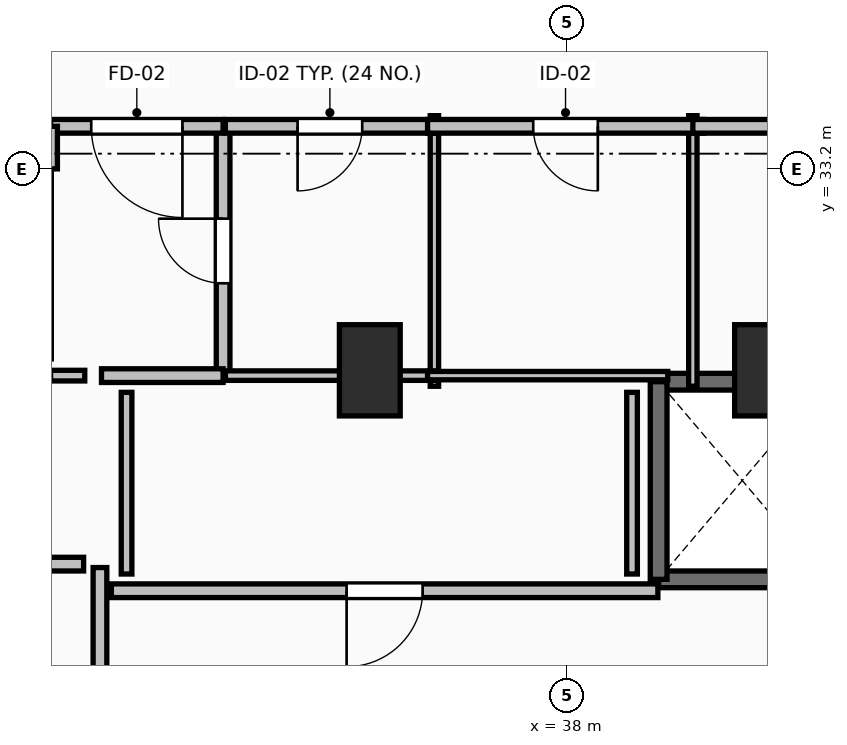
"""IFC4 building model, lengths in metres.
Left out: names, types, materials, properties, quantities, classifications, styles, units other than length and angle.
Written with IfcOpenShell. Run it as: python <this file> out.ifc"""

import sys

from ifc_helpers import new_model, si_unit, direction, frame, frame_2d, origin, origin_2d, place, context, subcontext, project, spatial, rectangle, extrude, element, fill, save


model = new_model("IFC4")
c1 = context("Model", 3, precision=1e-05, world=origin(), true_north=direction((0.0, 1.0)))
c2 = subcontext(c1, "Body", "Model", "MODEL_VIEW")
j1 = project(units=[si_unit("LENGTHUNIT", "METRE"), si_unit("PLANEANGLEUNIT", "RADIAN")], contexts=[c1])
p1 = place(None, origin())
s1 = spatial("IfcSite", under=j1, at=p1, CompositionType="ELEMENT")
p2 = place(p1, origin())
s2 = spatial("IfcBuilding", under=s1, at=p2, CompositionType="ELEMENT")
p3 = place(p2, frame((0.0, 0.0, 139.6)))
s3 = spatial("IfcBuildingStorey", under=s2, at=p3, CompositionType="ELEMENT", Elevation=139.6)
for number, where, z_axis, x_axis in (
    (1, (35.4, 30.55, 0.0), (0.0, 0.0, 1.0), (1.0, 0.0, 0.0)),
    (2, (40.6, 30.55, 0.0), (0.0, 0.0, 1.0), (1.0, 0.0, 0.0)),
):
    element("IfcColumn", number, at=place(p3, frame(where, z_axis=z_axis, x_axis=x_axis)), inside=s3, PredefinedType="PILASTER", context=c2, shape_type="SweptSolid", body=[
        extrude(rectangle(XDim=0.8, YDim=1.2, at=origin_2d()), origin(), (0.0, 0.0, 1.0), 3.5),
    ])
for number, where, z_axis, x_axis in (
    (3, (39.2, 27.8, 0.0), (0.0, 0.0, 1.0), (1.0, 0.0, 0.0)),
    (4, (41.4, 30.4, 0.0), (0.0, 0.0, 1.0), (-1.0, 0.0, 0.0)),
):
    element("IfcWall", number, at=place(p3, frame(where, z_axis=z_axis, x_axis=x_axis)), inside=s3, PredefinedType="SOLIDWALL", context=c2, shape_type="SweptSolid", body=[
        extrude(rectangle(XDim=2.2, YDim=0.22, at=frame_2d((1.1, 0.0))), origin(), (0.0, 0.0, 1.0), 3.24),
    ])
p4 = place(p3, frame((39.2, 30.4, 0.0), z_axis=(0.0, 0.0, 1.0), x_axis=(0.0, -1.0, 0.0)))
e5 = element("IfcWall", 5, at=p4, inside=s3, PredefinedType="SOLIDWALL", context=c2, shape_type="SweptSolid", body=[
    extrude(rectangle(XDim=2.6, YDim=0.22, at=frame_2d((1.3, 0.0))), origin(), (0.0, 0.0, 1.0), 3.24),
])
p5 = place(p3, frame((31.85, 24.045, 0.0), z_axis=(0.0, 0.0, 1.0), x_axis=(0.0, 1.0, 0.0)))
e6 = element("IfcWall", 6, at=p5, inside=s3, PredefinedType="PARTITIONING", context=c2, shape_type="SweptSolid", body=[
    extrude(rectangle(XDim=3.91, YDim=0.18, at=frame_2d((1.955, 0.0))), origin(), (0.0, 0.0, 1.0), 3.24),
])
p6 = place(p5, frame((1.355, 0.0, 0.0)))
e7 = element("IfcOpeningElement", 7, at=p6, cuts=e6, PredefinedType="OPENING", context=c2, shape_type="SweptSolid", body=[
    extrude(rectangle(XDim=1.2, YDim=2.15, at=frame_2d((0.6, 1.075))), frame((0.0, 0.105, 0.0), z_axis=(0.0, -1.0, 0.0), x_axis=(1.0, 0.0, 0.0)), (0.0, 0.0, 1.0), 0.21),
])
p7 = place(p3, frame((33.47, 30.48, 0.0), z_axis=(0.0, 0.0, 1.0), x_axis=(0.0, 1.0, 0.0)))
e8 = element("IfcWall", 8, at=p7, inside=s3, PredefinedType="PARTITIONING", context=c2, shape_type="SweptSolid", body=[
    extrude(rectangle(XDim=3.28, YDim=0.18, at=frame_2d((1.64, 0.0))), origin(), (0.0, 0.0, 1.0), 3.24),
])
p8 = place(p7, frame((1.215, 0.0, 0.0)))
e9 = element("IfcOpeningElement", 9, at=p8, cuts=e8, PredefinedType="OPENING", context=c2, shape_type="SweptSolid", body=[
    extrude(rectangle(XDim=0.85, YDim=2.1, at=frame_2d((0.425, 1.05))), frame((0.0, 0.105, 0.0), z_axis=(0.0, -1.0, 0.0), x_axis=(1.0, 0.0, 0.0)), (0.0, 0.0, 1.0), 0.21),
])
p9 = place(p3, frame((31.87, 30.48, 0.0), z_axis=(0.0, 0.0, 1.0), x_axis=(1.0, 0.0, 0.0)))
e10 = element("IfcWall", 10, at=p9, inside=s3, PredefinedType="PARTITIONING", context=c2, shape_type="SweptSolid", body=[
    extrude(rectangle(XDim=1.6, YDim=0.18, at=frame_2d((0.8, 0.0))), origin(), (0.0, 0.0, 1.0), 3.24),
])
p10 = place(p3, frame((33.47, 33.76, 0.0), z_axis=(0.0, 0.0, 1.0), x_axis=(-1.0, 0.0, 0.0)))
e11 = element("IfcWall", 11, at=p10, inside=s3, PredefinedType="PARTITIONING", context=c2, shape_type="SweptSolid", body=[
    extrude(rectangle(XDim=2.27, YDim=0.18, at=frame_2d((1.135, 0.0))), origin(), (0.0, 0.0, 1.0), 3.24),
])
p11 = place(p10, frame((0.535, 0.0, 0.0)))
e12 = element("IfcOpeningElement", 12, at=p11, cuts=e11, PredefinedType="OPENING", context=c2, shape_type="SweptSolid", body=[
    extrude(rectangle(XDim=1.2, YDim=2.15, at=frame_2d((0.6, 1.075))), frame((0.0, 0.105, 0.0), z_axis=(0.0, -1.0, 0.0), x_axis=(1.0, 0.0, 0.0)), (0.0, 0.0, 1.0), 0.21),
])
p12 = place(p3, frame((31.2, 33.76, 0.0), z_axis=(0.0, 0.0, 1.0), x_axis=(0.0, -1.0, 0.0)))
e13 = element("IfcWall", 13, at=p12, inside=s3, PredefinedType="PARTITIONING", context=c2, shape_type="SweptSolid", body=[
    extrude(rectangle(XDim=0.56, YDim=0.18, at=frame_2d((0.28, 0.0))), origin(), (0.0, 0.0, 1.0), 3.24),
])
p13 = place(p3, frame((39.19, 27.65, 0.0), z_axis=(0.0, 0.0, 1.0), x_axis=(-1.0, 0.0, 0.0)))
e14 = element("IfcWall", 14, at=p13, inside=s3, PredefinedType="PARTITIONING", context=c2, shape_type="SweptSolid", body=[
    extrude(rectangle(XDim=7.19, YDim=0.18, at=frame_2d((3.595, 0.0))), origin(), (0.0, 0.0, 1.0), 3.24),
])
p14 = place(p13, frame((3.095, 0.0, 0.0)))
e15 = element("IfcOpeningElement", 15, at=p14, cuts=e14, PredefinedType="OPENING", context=c2, shape_type="SweptSolid", body=[
    extrude(rectangle(XDim=1.0, YDim=2.15, at=frame_2d((0.5, 1.075))), frame((0.0, 0.105, 0.0), z_axis=(0.0, -1.0, 0.0), x_axis=(1.0, 0.0, 0.0)), (0.0, 0.0, 1.0), 0.21),
])
p15 = place(p3, frame((36.25, 30.34, 0.0), z_axis=(0.0, 0.0, 1.0), x_axis=(0.0, 1.0, 0.0)))
e16 = element("IfcWall", 16, at=p15, inside=s3, PredefinedType="PARTITIONING", context=c2, shape_type="SweptSolid", body=[
    extrude(rectangle(XDim=3.56, YDim=0.11, at=frame_2d((1.78, 0.0))), origin(), (0.0, 0.0, 1.0), 2.432),
])
p16 = place(p3, frame((33.5, 30.48, 0.0), z_axis=(0.0, 0.0, 1.0), x_axis=(1.0, 0.0, 0.0)))
e17 = element("IfcWall", 17, at=p16, inside=s3, PredefinedType="PARTITIONING", context=c2, shape_type="SweptSolid", body=[
    extrude(rectangle(XDim=2.75, YDim=0.125, at=frame_2d((1.375, 0.0))), origin(), (0.0, 0.0, 1.0), 2.432),
])
p17 = place(p3, frame((36.25, 33.76, 0.0), z_axis=(0.0, 0.0, 1.0), x_axis=(-1.0, 0.0, 0.0)))
e18 = element("IfcWall", 18, at=p17, inside=s3, PredefinedType="PARTITIONING", context=c2, shape_type="SweptSolid", body=[
    extrude(rectangle(XDim=2.75, YDim=0.18, at=frame_2d((1.375, 0.0))), origin(), (0.0, 0.0, 1.0), 3.24),
])
p18 = place(p17, frame((0.95, 0.0, 0.0)))
e19 = element("IfcOpeningElement", 19, at=p18, cuts=e18, PredefinedType="OPENING", context=c2, shape_type="SweptSolid", body=[
    extrude(rectangle(XDim=0.85, YDim=2.1, at=frame_2d((0.425, 1.05))), frame((0.0, 0.105, 0.0), z_axis=(0.0, -1.0, 0.0), x_axis=(1.0, 0.0, 0.0)), (0.0, 0.0, 1.0), 0.21),
])
p19 = place(p3, frame((39.65, 30.34, 0.0), z_axis=(0.0, 0.0, 1.0), x_axis=(0.0, 1.0, 0.0)))
e20 = element("IfcWall", 20, at=p19, inside=s3, PredefinedType="PARTITIONING", context=c2, shape_type="SweptSolid", body=[
    extrude(rectangle(XDim=3.56, YDim=0.11, at=frame_2d((1.78, 0.0))), origin(), (0.0, 0.0, 1.0), 2.432),
])
p20 = place(p3, frame((36.16, 30.48, 0.0), z_axis=(0.0, 0.0, 1.0), x_axis=(1.0, 0.0, 0.0)))
e21 = element("IfcWall", 21, at=p20, inside=s3, PredefinedType="PARTITIONING", context=c2, shape_type="SweptSolid", body=[
    extrude(rectangle(XDim=3.16, YDim=0.11, at=frame_2d((1.58, 0.0))), origin(), (0.0, 0.0, 1.0), 2.432),
])
p21 = place(p3, frame((39.79, 33.76, 0.0), z_axis=(0.0, 0.0, 1.0), x_axis=(-1.0, 0.0, 0.0)))
e22 = element("IfcWall", 22, at=p21, inside=s3, PredefinedType="PARTITIONING", context=c2, shape_type="SweptSolid", body=[
    extrude(rectangle(XDim=3.63, YDim=0.18, at=frame_2d((1.815, 0.0))), origin(), (0.0, 0.0, 1.0), 3.24),
])
p22 = place(p21, frame((1.39, 0.0, 0.0)))
e23 = element("IfcOpeningElement", 23, at=p22, cuts=e22, PredefinedType="OPENING", context=c2, shape_type="SweptSolid", body=[
    extrude(rectangle(XDim=0.85, YDim=2.1, at=frame_2d((0.425, 1.05))), frame((0.0, 0.105, 0.0), z_axis=(0.0, -1.0, 0.0), x_axis=(1.0, 0.0, 0.0)), (0.0, 0.0, 1.0), 0.21),
])
p23 = place(p3, frame((44.26, 33.76, 0.0), z_axis=(0.0, 0.0, 1.0), x_axis=(-1.0, 0.0, 0.0)))
e24 = element("IfcWall", 24, at=p23, inside=s3, PredefinedType="PARTITIONING", context=c2, shape_type="SweptSolid", body=[
    extrude(rectangle(XDim=4.61, YDim=0.18, at=frame_2d((2.305, 0.0))), origin(), (0.0, 0.0, 1.0), 3.24),
])
p24 = place(p23, frame((1.88, 0.0, 0.0)))
e25 = element("IfcOpeningElement", 25, at=p24, cuts=e24, PredefinedType="OPENING", context=c2, shape_type="SweptSolid", body=[
    extrude(rectangle(XDim=0.85, YDim=2.1, at=frame_2d((0.425, 1.05))), frame((0.0, 0.105, 0.0), z_axis=(0.0, -1.0, 0.0), x_axis=(1.0, 0.0, 0.0)), (0.0, 0.0, 1.0), 0.21),
])
p25 = place(p3, frame((31.635, 28.0, 0.0), z_axis=(0.0, 0.0, 1.0), x_axis=(-1.0, 0.0, 0.0)))
e26 = element("IfcWall", 26, at=p25, inside=s3, PredefinedType="PARTITIONING", context=c2, shape_type="SweptSolid", body=[
    extrude(rectangle(XDim=0.915, YDim=0.18, at=frame_2d((0.458, 0.0))), origin(), (0.0, 0.0, 1.0), 3.24),
])
p26 = place(p3, frame((31.2, 30.48, 0.0), z_axis=(0.0, 0.0, 1.0), x_axis=(1.0, 0.0, 0.0)))
e27 = element("IfcWall", 27, at=p26, inside=s3, PredefinedType="PARTITIONING", context=c2, shape_type="SweptSolid", body=[
    extrude(rectangle(XDim=0.45, YDim=0.14, at=frame_2d((0.225, 0.0))), origin(), (0.0, 0.0, 1.0), 3.24),
])
for number, where, z_axis, x_axis in (
    (28, (32.2, 30.26, 0.0), (0.0, 0.0, 1.0), (0.0, -1.0, 0.0)),
    (29, (38.85, 27.87, 0.0), (0.0, 0.0, 1.0), (0.0, 1.0, 0.0)),
):
    element("IfcWall", number, at=place(p3, frame(where, z_axis=z_axis, x_axis=x_axis)), inside=s3, PredefinedType="PARTITIONING", context=c2, shape_type="SweptSolid", body=[
        extrude(rectangle(XDim=2.39, YDim=0.14, at=frame_2d((1.195, 0.0))), origin(), (0.0, 0.0, 1.0), 3.24),
    ])
p27 = place(p8, origin())
e30 = element("IfcDoor", 30, at=p27, inside=s3, OperationType="SINGLE_SWING_RIGHT", PredefinedType="DOOR", context=c2, shape_type="SweptSolid", body=[
    extrude(rectangle(XDim=0.85, YDim=2.1, at=frame_2d((0.425, 1.05))), frame((0.0, 0.025, 0.0), z_axis=(0.0, -1.0, 0.0), x_axis=(1.0, 0.0, 0.0)), (0.0, 0.0, 1.0), 0.05),
])
fill(e9, e30)
p28 = place(p11, origin())
e31 = element("IfcDoor", 31, at=p28, inside=s3, OperationType="SINGLE_SWING_LEFT", PredefinedType="DOOR", context=c2, shape_type="SweptSolid", body=[
    extrude(rectangle(XDim=1.2, YDim=2.15, at=frame_2d((0.6, 1.075))), frame((0.0, 0.025, 0.0), z_axis=(0.0, -1.0, 0.0), x_axis=(1.0, 0.0, 0.0)), (0.0, 0.0, 1.0), 0.05),
])
fill(e12, e31)
p29 = place(p14, origin())
e32 = element("IfcDoor", 32, at=p29, inside=s3, OperationType="SINGLE_SWING_RIGHT", PredefinedType="DOOR", context=c2, shape_type="SweptSolid", body=[
    extrude(rectangle(XDim=1.0, YDim=2.15, at=frame_2d((0.5, 1.075))), frame((0.0, 0.025, 0.0), z_axis=(0.0, -1.0, 0.0), x_axis=(1.0, 0.0, 0.0)), (0.0, 0.0, 1.0), 0.05),
])
fill(e15, e32)
p30 = place(p18, origin())
e33 = element("IfcDoor", 33, at=p30, inside=s3, OperationType="SINGLE_SWING_RIGHT", PredefinedType="DOOR", context=c2, shape_type="SweptSolid", body=[
    extrude(rectangle(XDim=0.85, YDim=2.1, at=frame_2d((0.425, 1.05))), frame((0.0, 0.025, 0.0), z_axis=(0.0, -1.0, 0.0), x_axis=(1.0, 0.0, 0.0)), (0.0, 0.0, 1.0), 0.05),
])
fill(e19, e33)
p31 = place(p22, origin())
e34 = element("IfcDoor", 34, at=p31, inside=s3, OperationType="SINGLE_SWING_LEFT", PredefinedType="DOOR", context=c2, shape_type="SweptSolid", body=[
    extrude(rectangle(XDim=0.85, YDim=2.1, at=frame_2d((0.425, 1.05))), frame((0.0, 0.025, 0.0), z_axis=(0.0, -1.0, 0.0), x_axis=(1.0, 0.0, 0.0)), (0.0, 0.0, 1.0), 0.05),
])
fill(e23, e34)
save(model, sys.argv[1])
